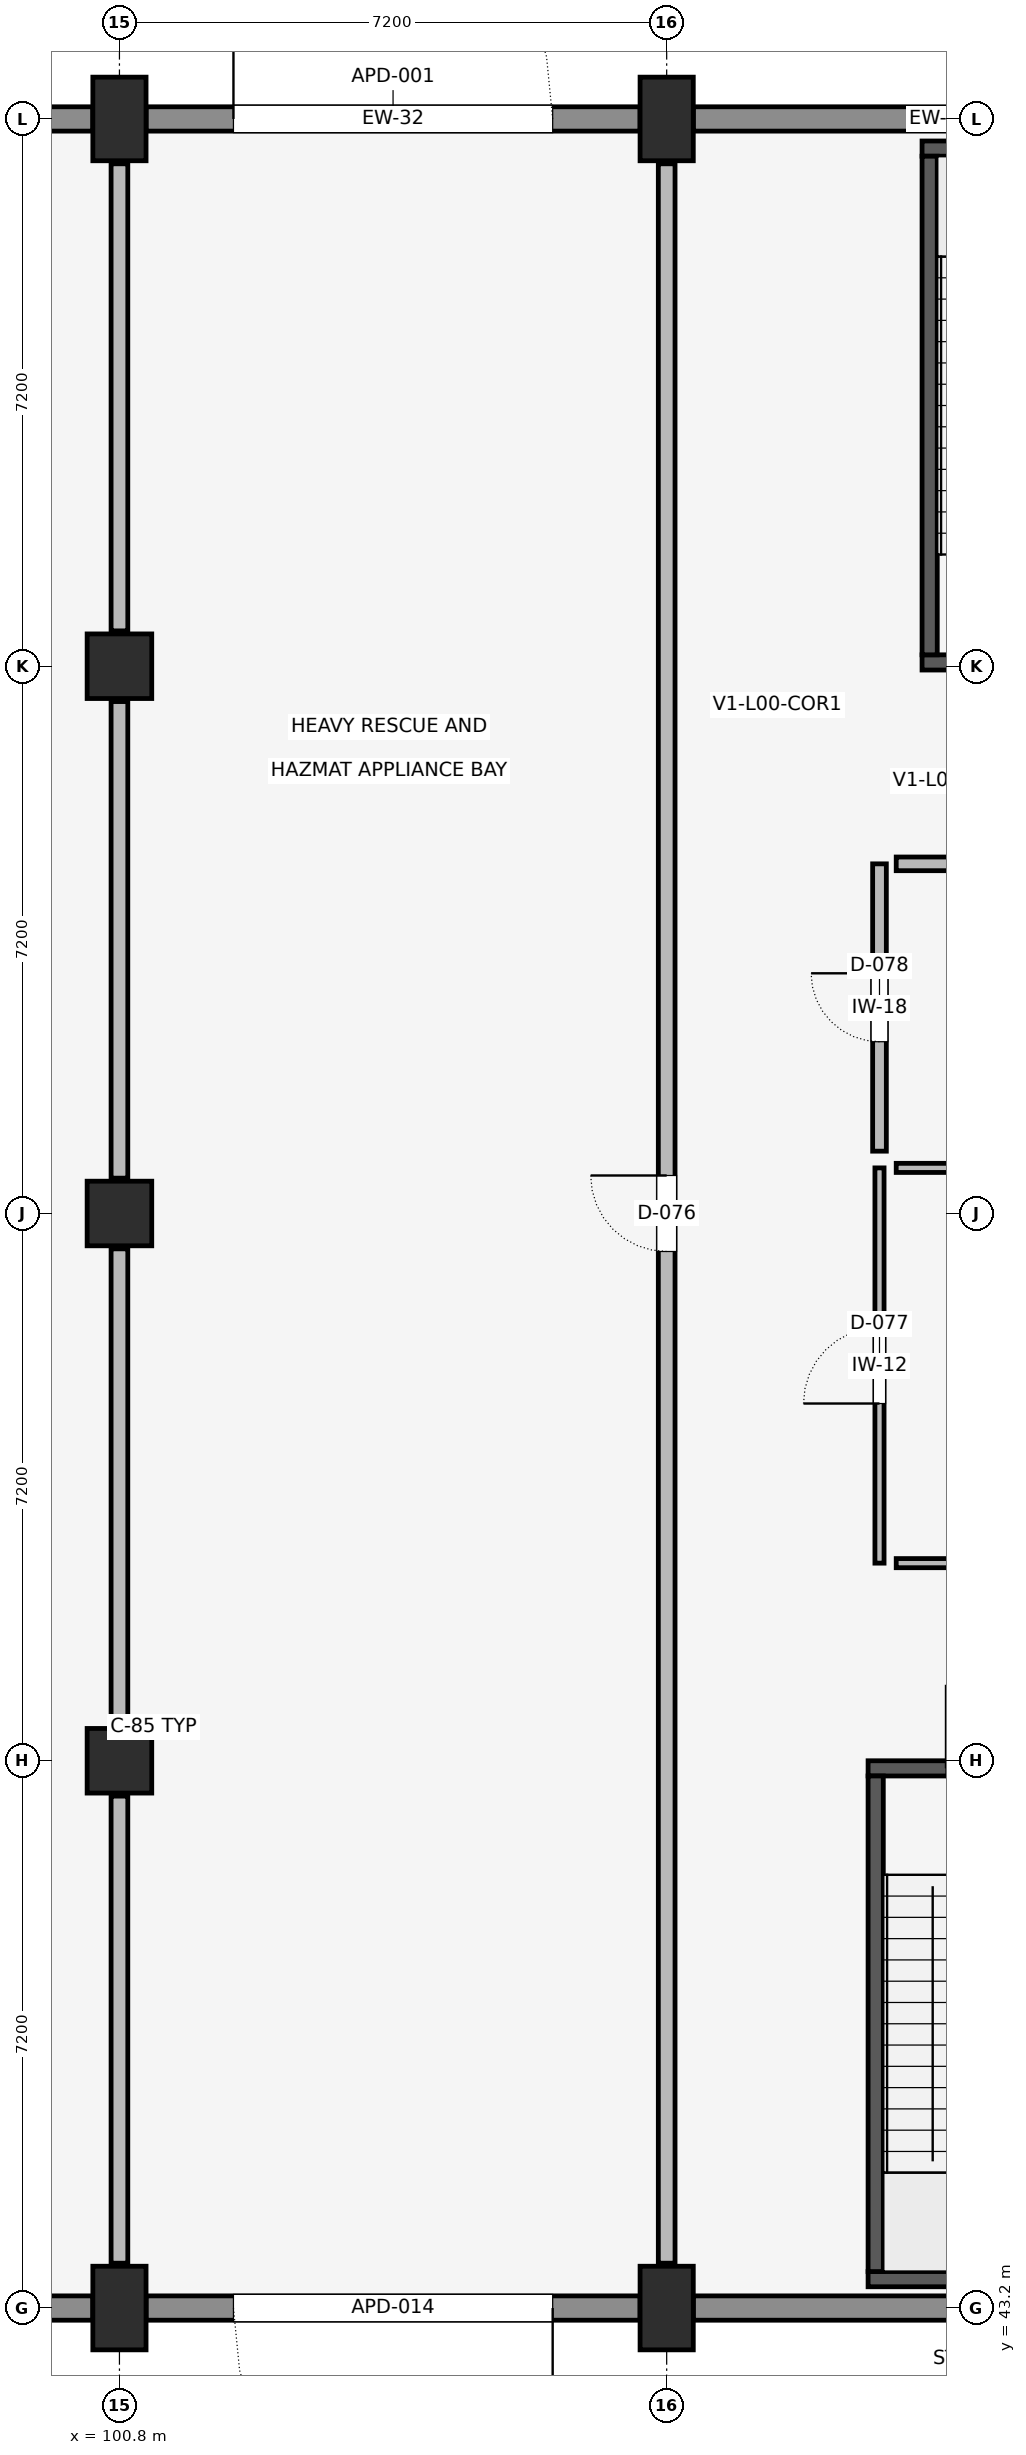
"""IFC4 building model, lengths in metres.
Left out: names, types, materials, properties, quantities, classifications, styles, units other than length and angle.
Written with IfcOpenShell. Run it as: python <this file> out.ifc"""

import sys

from ifc_helpers import new_model, si_unit, direction, frame, frame_2d, origin, origin_2d, place, context, subcontext, project, spatial, rectangle, extrude, element, fill, save


model = new_model("IFC4")
c1 = context("Model", 3, precision=1e-05, world=origin(), true_north=direction((0.0, 1.0)))
c2 = subcontext(c1, "Body", "Model", "MODEL_VIEW")
j1 = project(units=[si_unit("LENGTHUNIT", "METRE"), si_unit("PLANEANGLEUNIT", "RADIAN")], contexts=[c1])
p1 = place(None, origin())
s1 = spatial("IfcSite", under=j1, at=p1, CompositionType="ELEMENT")
p2 = place(p1, origin())
s2 = spatial("IfcBuilding", under=s1, at=p2, CompositionType="ELEMENT")
p3 = place(p2, origin())
s3 = spatial("IfcBuildingStorey", under=s2, at=p3, CompositionType="ELEMENT", Elevation=0.0)
p4 = place(p3, frame((100.8, 43.2, 0.0), z_axis=(0.0, 0.0, 1.0), x_axis=(1.0, 0.0, 0.0)))
e1 = element("IfcColumn", 1, at=p4, inside=s3, PredefinedType="PILASTER", context=c2, shape_type="SweptSolid", body=[
    extrude(rectangle(XDim=0.7, YDim=1.1, at=origin_2d()), origin(), (0.0, 0.0, 1.0), 5.4),
])
for number, where, z_axis, x_axis in (
    (2, (100.8, 50.4, 0.0), (0.0, 0.0, 1.0), (1.0, 0.0, 0.0)),
    (3, (100.8, 57.6, 0.0), (0.0, 0.0, 1.0), (1.0, 0.0, 0.0)),
    (4, (100.8, 64.8, 0.0), (0.0, 0.0, 1.0), (1.0, 0.0, 0.0)),
):
    element("IfcColumn", number, at=place(p3, frame(where, z_axis=z_axis, x_axis=x_axis)), inside=s3, PredefinedType="COLUMN", context=c2, shape_type="SweptSolid", body=[
        extrude(rectangle(XDim=0.85, YDim=0.85, at=origin_2d()), origin(), (0.0, 0.0, 1.0), 5.4),
    ])
for number, where, z_axis, x_axis in (
    (5, (100.8, 72.0, 0.0), (0.0, 0.0, 1.0), (1.0, 0.0, 0.0)),
    (6, (108.0, 43.2, 0.0), (0.0, 0.0, 1.0), (1.0, 0.0, 0.0)),
    (7, (108.0, 72.0, 0.0), (0.0, 0.0, 1.0), (1.0, 0.0, 0.0)),
):
    element("IfcColumn", number, at=place(p3, frame(where, z_axis=z_axis, x_axis=x_axis)), inside=s3, PredefinedType="PILASTER", context=c2, shape_type="SweptSolid", body=[
        extrude(rectangle(XDim=0.7, YDim=1.1, at=origin_2d()), origin(), (0.0, 0.0, 1.0), 5.4),
    ])
p5 = place(p3, frame((111.36, 64.85, 0.0), z_axis=(0.0, 0.0, 1.0), x_axis=(1.0, 0.0, 0.0)))
e8 = element("IfcWall", 8, at=p5, inside=s3, PredefinedType="SHEAR", context=c2, shape_type="SweptSolid", body=[
    extrude(rectangle(XDim=3.54, YDim=0.2, at=frame_2d((1.77, 0.0))), origin(), (0.0, 0.0, 1.0), 4.95),
])
p6 = place(p5, frame((1.22, 0.0, 0.0)))
e9 = element("IfcOpeningElement", 9, at=p6, cuts=e8, PredefinedType="OPENING", context=c2, shape_type="SweptSolid", body=[
    extrude(rectangle(XDim=1.1, YDim=2.15, at=frame_2d((0.55, 1.075))), frame((0.0, 0.112, 0.0), z_axis=(0.0, -1.0, 0.0), x_axis=(1.0, 0.0, 0.0)), (0.0, 0.0, 1.0), 0.224),
])
p7 = place(p3, frame((111.36, 71.61, 0.0), z_axis=(0.0, 0.0, 1.0), x_axis=(1.0, 0.0, 0.0)))
e10 = element("IfcWall", 10, at=p7, inside=s3, PredefinedType="SHEAR", context=c2, shape_type="SweptSolid", body=[
    extrude(rectangle(XDim=3.49, YDim=0.2, at=frame_2d((1.745, 0.0))), origin(), (0.0, 0.0, 1.0), 4.95),
])
p8 = place(p3, frame((111.46, 64.95, 0.0), z_axis=(0.0, 0.0, 1.0), x_axis=(0.0, 1.0, 0.0)))
e11 = element("IfcWall", 11, at=p8, inside=s3, PredefinedType="SHEAR", context=c2, shape_type="SweptSolid", body=[
    extrude(rectangle(XDim=6.56, YDim=0.2, at=frame_2d((3.28, 0.0))), origin(), (0.0, 0.0, 1.0), 4.95),
])
p9 = place(p3, frame((110.65, 43.58, 0.0), z_axis=(0.0, 0.0, 1.0), x_axis=(1.0, 0.0, 0.0)))
e12 = element("IfcWall", 12, at=p9, inside=s3, PredefinedType="SHEAR", context=c2, shape_type="SweptSolid", body=[
    extrude(rectangle(XDim=3.15, YDim=0.2, at=frame_2d((1.575, 0.0))), origin(), (0.0, 0.0, 1.0), 4.95),
])
p10 = place(p3, frame((110.65, 50.3, 0.0), z_axis=(0.0, 0.0, 1.0), x_axis=(1.0, 0.0, 0.0)))
e13 = element("IfcWall", 13, at=p10, inside=s3, PredefinedType="SHEAR", context=c2, shape_type="SweptSolid", body=[
    extrude(rectangle(XDim=3.15, YDim=0.2, at=frame_2d((1.575, 0.0))), origin(), (0.0, 0.0, 1.0), 4.95),
])
p11 = place(p10, frame((1.025, 0.0, 0.0)))
e14 = element("IfcOpeningElement", 14, at=p11, cuts=e13, PredefinedType="OPENING", context=c2, shape_type="SweptSolid", body=[
    extrude(rectangle(XDim=1.1, YDim=2.15, at=frame_2d((0.55, 1.075))), frame((0.0, 0.112, 0.0), z_axis=(0.0, -1.0, 0.0), x_axis=(1.0, 0.0, 0.0)), (0.0, 0.0, 1.0), 0.224),
])
p12 = place(p3, frame((110.75, 43.68, 0.0), z_axis=(0.0, 0.0, 1.0), x_axis=(0.0, 1.0, 0.0)))
e15 = element("IfcWall", 15, at=p12, inside=s3, PredefinedType="SHEAR", context=c2, shape_type="SweptSolid", body=[
    extrude(rectangle(XDim=6.52, YDim=0.2, at=frame_2d((3.26, 0.0))), origin(), (0.0, 0.0, 1.0), 4.95),
])
p13 = place(p3, frame((114.85, 72.0, 0.0), z_axis=(0.0, 0.0, 1.0), x_axis=(-1.0, 0.0, 0.0)))
e16 = element("IfcWall", 16, at=p13, inside=s3, PredefinedType="ELEMENTEDWALL", context=c2, shape_type="SweptSolid", body=[
    extrude(rectangle(XDim=6.5, YDim=0.32, at=frame_2d((3.25, 0.0))), origin(), (0.0, 0.0, 1.0), 4.29),
])
p14 = place(p3, frame((107.65, 72.0, 0.0), z_axis=(0.0, 0.0, 1.0), x_axis=(-1.0, 0.0, 0.0)))
e17 = element("IfcWall", 17, at=p14, inside=s3, PredefinedType="ELEMENTEDWALL", context=c2, shape_type="SweptSolid", body=[
    extrude(rectangle(XDim=6.5, YDim=0.32, at=frame_2d((3.25, 0.0))), origin(), (0.0, 0.0, 1.0), 4.29),
])
p15 = place(p14, frame((1.15, 0.0, 0.0)))
e18 = element("IfcOpeningElement", 18, at=p15, cuts=e17, PredefinedType="OPENING", context=c2, shape_type="SweptSolid", body=[
    extrude(rectangle(XDim=4.2, YDim=3.4, at=frame_2d((2.1, 1.7))), frame((0.0, 0.172, 0.0), z_axis=(0.0, -1.0, 0.0), x_axis=(1.0, 0.0, 0.0)), (0.0, 0.0, 1.0), 0.344),
])
p16 = place(p3, frame((100.45, 72.0, 0.0), z_axis=(0.0, 0.0, 1.0), x_axis=(-1.0, 0.0, 0.0)))
e19 = element("IfcWall", 19, at=p16, inside=s3, PredefinedType="ELEMENTEDWALL", context=c2, shape_type="SweptSolid", body=[
    extrude(rectangle(XDim=6.5, YDim=0.32, at=frame_2d((3.25, 0.0))), origin(), (0.0, 0.0, 1.0), 4.49),
])
p17 = place(p16, frame((1.15, 0.0, 0.0)))
e20 = element("IfcOpeningElement", 20, at=p17, cuts=e19, PredefinedType="OPENING", context=c2, shape_type="SweptSolid", body=[
    extrude(rectangle(XDim=4.2, YDim=4.2, at=frame_2d((2.1, 2.1))), frame((0.0, 0.172, 0.0), z_axis=(0.0, -1.0, 0.0), x_axis=(1.0, 0.0, 0.0)), (0.0, 0.0, 1.0), 0.344),
])
p18 = place(p3, frame((93.95, 43.2, 0.0), z_axis=(0.0, 0.0, 1.0), x_axis=(1.0, 0.0, 0.0)))
e21 = element("IfcWall", 21, at=p18, inside=s3, PredefinedType="ELEMENTEDWALL", context=c2, shape_type="SweptSolid", body=[
    extrude(rectangle(XDim=6.5, YDim=0.32, at=frame_2d((3.25, 0.0))), origin(), (0.0, 0.0, 1.0), 4.49),
])
p19 = place(p18, frame((1.15, 0.0, 0.0)))
e22 = element("IfcOpeningElement", 22, at=p19, cuts=e21, PredefinedType="OPENING", context=c2, shape_type="SweptSolid", body=[
    extrude(rectangle(XDim=4.2, YDim=4.2, at=frame_2d((2.1, 2.1))), frame((0.0, 0.172, 0.0), z_axis=(0.0, -1.0, 0.0), x_axis=(1.0, 0.0, 0.0)), (0.0, 0.0, 1.0), 0.344),
])
p20 = place(p3, frame((101.15, 43.2, 0.0), z_axis=(0.0, 0.0, 1.0), x_axis=(1.0, 0.0, 0.0)))
e23 = element("IfcWall", 23, at=p20, inside=s3, PredefinedType="ELEMENTEDWALL", context=c2, shape_type="SweptSolid", body=[
    extrude(rectangle(XDim=6.5, YDim=0.32, at=frame_2d((3.25, 0.0))), origin(), (0.0, 0.0, 1.0), 4.29),
])
p21 = place(p20, frame((1.15, 0.0, 0.0)))
e24 = element("IfcOpeningElement", 24, at=p21, cuts=e23, PredefinedType="OPENING", context=c2, shape_type="SweptSolid", body=[
    extrude(rectangle(XDim=4.2, YDim=3.4, at=frame_2d((2.1, 1.7))), frame((0.0, 0.172, 0.0), z_axis=(0.0, -1.0, 0.0), x_axis=(1.0, 0.0, 0.0)), (0.0, 0.0, 1.0), 0.344),
])
p22 = place(p3, frame((108.35, 43.2, 0.0), z_axis=(0.0, 0.0, 1.0), x_axis=(1.0, 0.0, 0.0)))
e25 = element("IfcWall", 25, at=p22, inside=s3, PredefinedType="ELEMENTEDWALL", context=c2, shape_type="SweptSolid", body=[
    extrude(rectangle(XDim=6.5, YDim=0.32, at=frame_2d((3.25, 0.0))), origin(), (0.0, 0.0, 1.0), 4.29),
])
p23 = place(p3, frame((100.8, 43.79, 0.0), z_axis=(0.0, 0.0, 1.0), x_axis=(0.0, 1.0, 0.0)))
e26 = element("IfcWall", 26, at=p23, inside=s3, PredefinedType="STANDARD", context=c2, shape_type="SweptSolid", body=[
    extrude(rectangle(XDim=6.145, YDim=0.22, at=frame_2d((3.073, 0.0))), origin(), (0.0, 0.0, 1.0), 4.338),
])
p24 = place(p3, frame((100.8, 50.865, 0.0), z_axis=(0.0, 0.0, 1.0), x_axis=(0.0, 1.0, 0.0)))
e27 = element("IfcWall", 27, at=p24, inside=s3, PredefinedType="STANDARD", context=c2, shape_type="SweptSolid", body=[
    extrude(rectangle(XDim=6.27, YDim=0.22, at=frame_2d((3.135, 0.0))), origin(), (0.0, 0.0, 1.0), 4.288),
])
p25 = place(p3, frame((100.8, 58.065, 0.0), z_axis=(0.0, 0.0, 1.0), x_axis=(0.0, 1.0, 0.0)))
e28 = element("IfcWall", 28, at=p25, inside=s3, PredefinedType="STANDARD", context=c2, shape_type="SweptSolid", body=[
    extrude(rectangle(XDim=6.27, YDim=0.22, at=frame_2d((3.135, 0.0))), origin(), (0.0, 0.0, 1.0), 4.338),
])
p26 = place(p3, frame((100.8, 65.265, 0.0), z_axis=(0.0, 0.0, 1.0), x_axis=(0.0, 1.0, 0.0)))
e29 = element("IfcWall", 29, at=p26, inside=s3, PredefinedType="STANDARD", context=c2, shape_type="SweptSolid", body=[
    extrude(rectangle(XDim=6.145, YDim=0.22, at=frame_2d((3.073, 0.0))), origin(), (0.0, 0.0, 1.0), 4.288),
])
p27 = place(p3, frame((108.0, 43.79, 0.0), z_axis=(0.0, 0.0, 1.0), x_axis=(0.0, 1.0, 0.0)))
e30 = element("IfcWall", 30, at=p27, inside=s3, PredefinedType="STANDARD", context=c2, shape_type="SweptSolid", body=[
    extrude(rectangle(XDim=27.62, YDim=0.22, at=frame_2d((13.81, 0.0))), origin(), (0.0, 0.0, 1.0), 3.438),
])
p28 = place(p27, frame((13.31, 0.0, 0.0)))
e31 = element("IfcOpeningElement", 31, at=p28, cuts=e30, PredefinedType="OPENING", context=c2, shape_type="SweptSolid", body=[
    extrude(rectangle(XDim=1.0, YDim=2.15, at=frame_2d((0.5, 1.075))), frame((0.0, 0.122, 0.0), z_axis=(0.0, -1.0, 0.0), x_axis=(1.0, 0.0, 0.0)), (0.0, 0.0, 1.0), 0.244),
])
p29 = place(p3, frame((110.8, 53.0, 0.0), z_axis=(0.0, 0.0, 1.0), x_axis=(0.0, 1.0, 0.0)))
e32 = element("IfcWall", 32, at=p29, inside=s3, PredefinedType="PARTITIONING", context=c2, shape_type="SweptSolid", body=[
    extrude(rectangle(XDim=5.2, YDim=0.12, at=frame_2d((2.6, 0.0))), origin(), (0.0, 0.0, 1.0), 3.438),
])
p30 = place(p29, frame((2.1, 0.0, 0.0)))
e33 = element("IfcOpeningElement", 33, at=p30, cuts=e32, PredefinedType="OPENING", context=c2, shape_type="SweptSolid", body=[
    extrude(rectangle(XDim=1.0, YDim=2.15, at=frame_2d((0.5, 1.075))), frame((0.0, 0.072, 0.0), z_axis=(0.0, -1.0, 0.0), x_axis=(1.0, 0.0, 0.0)), (0.0, 0.0, 1.0), 0.144),
])
for number, where, z_axis, x_axis in (
    (34, (111.02, 53.0, 0.0), (0.0, 0.0, 1.0), (1.0, 0.0, 0.0)),
    (35, (111.02, 58.2, 0.0), (0.0, 0.0, 1.0), (1.0, 0.0, 0.0)),
):
    element("IfcWall", number, at=place(p3, frame(where, z_axis=z_axis, x_axis=x_axis)), inside=s3, PredefinedType="PARTITIONING", context=c2, shape_type="SweptSolid", body=[
        extrude(rectangle(XDim=3.96, YDim=0.12, at=frame_2d((1.98, 0.0))), origin(), (0.0, 0.0, 1.0), 4.942),
    ])
p31 = place(p3, frame((110.8, 58.42, 0.0), z_axis=(0.0, 0.0, 1.0), x_axis=(0.0, 1.0, 0.0)))
e36 = element("IfcWall", 36, at=p31, inside=s3, PredefinedType="PLUMBINGWALL", context=c2, shape_type="SweptSolid", body=[
    extrude(rectangle(XDim=3.78, YDim=0.18, at=frame_2d((1.89, 0.0))), origin(), (0.0, 0.0, 1.0), 4.942),
])
p32 = place(p31, frame((1.44, 0.0, 0.0)))
e37 = element("IfcOpeningElement", 37, at=p32, cuts=e36, PredefinedType="OPENING", context=c2, shape_type="SweptSolid", body=[
    extrude(rectangle(XDim=0.9, YDim=2.1, at=frame_2d((0.45, 1.05))), frame((0.0, 0.102, 0.0), z_axis=(0.0, -1.0, 0.0), x_axis=(1.0, 0.0, 0.0)), (0.0, 0.0, 1.0), 0.204),
])
p33 = place(p3, frame((111.02, 62.2, 0.0), z_axis=(0.0, 0.0, 1.0), x_axis=(1.0, 0.0, 0.0)))
e38 = element("IfcWall", 38, at=p33, inside=s3, PredefinedType="PLUMBINGWALL", context=c2, shape_type="SweptSolid", body=[
    extrude(rectangle(XDim=3.96, YDim=0.18, at=frame_2d((1.98, 0.0))), origin(), (0.0, 0.0, 1.0), 4.942),
])
p34 = place(p15, frame((4.2, 0.0, 0.0), z_axis=(0.0, 0.0, 1.0), x_axis=(-1.0, 0.0, 0.0)))
e39 = element("IfcDoor", 39, at=p34, inside=s3, OperationType="DOUBLE_SWING_LEFT", PredefinedType="DOOR", context=c2, shape_type="SweptSolid", body=[
    extrude(rectangle(XDim=4.2, YDim=3.4, at=frame_2d((2.1, 1.7))), frame((0.0, 0.025, 0.0), z_axis=(0.0, -1.0, 0.0), x_axis=(1.0, 0.0, 0.0)), (0.0, 0.0, 1.0), 0.05),
])
fill(e18, e39)
p35 = place(p21, frame((4.2, 0.0, 0.0), z_axis=(0.0, 0.0, 1.0), x_axis=(-1.0, 0.0, 0.0)))
e40 = element("IfcDoor", 40, at=p35, inside=s3, OperationType="DOUBLE_SWING_LEFT", PredefinedType="DOOR", context=c2, shape_type="SweptSolid", body=[
    extrude(rectangle(XDim=4.2, YDim=3.4, at=frame_2d((2.1, 1.7))), frame((0.0, 0.025, 0.0), z_axis=(0.0, -1.0, 0.0), x_axis=(1.0, 0.0, 0.0)), (0.0, 0.0, 1.0), 0.05),
])
fill(e24, e40)
p36 = place(p11, origin())
e41 = element("IfcDoor", 41, at=p36, inside=s3, OperationType="SINGLE_SWING_LEFT", PredefinedType="DOOR", context=c2, shape_type="SweptSolid", body=[
    extrude(rectangle(XDim=1.1, YDim=2.15, at=frame_2d((0.55, 1.075))), frame((0.0, 0.025, 0.0), z_axis=(0.0, -1.0, 0.0), x_axis=(1.0, 0.0, 0.0)), (0.0, 0.0, 1.0), 0.05),
])
fill(e14, e41)
p37 = place(p28, origin())
e42 = element("IfcDoor", 42, at=p37, inside=s3, OperationType="SINGLE_SWING_RIGHT", PredefinedType="DOOR", context=c2, shape_type="SweptSolid", body=[
    extrude(rectangle(XDim=1.0, YDim=2.15, at=frame_2d((0.5, 1.075))), frame((0.0, 0.025, 0.0), z_axis=(0.0, -1.0, 0.0), x_axis=(1.0, 0.0, 0.0)), (0.0, 0.0, 1.0), 0.05),
])
fill(e31, e42)
p38 = place(p30, origin())
e43 = element("IfcDoor", 43, at=p38, inside=s3, OperationType="SINGLE_SWING_LEFT", PredefinedType="DOOR", context=c2, shape_type="SweptSolid", body=[
    extrude(rectangle(XDim=1.0, YDim=2.15, at=frame_2d((0.5, 1.075))), frame((0.0, 0.025, 0.0), z_axis=(0.0, -1.0, 0.0), x_axis=(1.0, 0.0, 0.0)), (0.0, 0.0, 1.0), 0.05),
])
fill(e33, e43)
p39 = place(p32, origin())
e44 = element("IfcDoor", 44, at=p39, inside=s3, OperationType="SINGLE_SWING_RIGHT", PredefinedType="DOOR", context=c2, shape_type="SweptSolid", body=[
    extrude(rectangle(XDim=0.9, YDim=2.1, at=frame_2d((0.45, 1.05))), frame((0.0, 0.025, 0.0), z_axis=(0.0, -1.0, 0.0), x_axis=(1.0, 0.0, 0.0)), (0.0, 0.0, 1.0), 0.05),
])
fill(e37, e44)
save(model, sys.argv[1])
